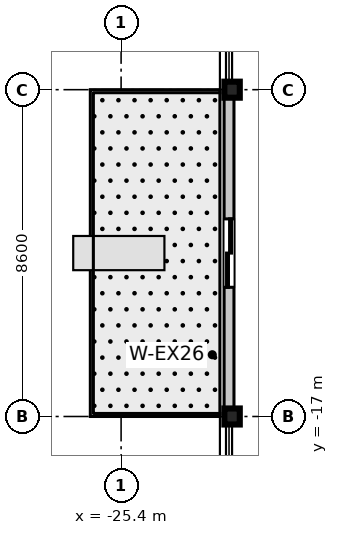
"""IFC4 building model, lengths in metres.
Left out: names, types, materials, properties, quantities, classifications, styles, units other than length and angle.
Written with IfcOpenShell. Run it as: python <this file> out.ifc"""

import sys

from ifc_helpers import new_model, si_unit, direction, frame, frame_2d, origin, origin_2d, place, context, subcontext, project, spatial, rectangle, i_section, extrude, source, transform, mapped, element, fill, save


model = new_model("IFC4")
c1 = context("Model", 3, precision=1e-05, world=origin(), true_north=direction((0.0, 1.0)))
c2 = subcontext(c1, "Body", "Model", "MODEL_VIEW")
j1 = project(units=[si_unit("LENGTHUNIT", "METRE"), si_unit("PLANEANGLEUNIT", "RADIAN")], contexts=[c1])
p1 = place(None, origin())
s1 = spatial("IfcSite", under=j1, at=p1, CompositionType="ELEMENT")
p2 = place(p1, origin())
s2 = spatial("IfcBuilding", under=s1, at=p2, CompositionType="ELEMENT")
p3 = place(p2, frame((0.0, 0.0, 185.5)))
s3 = spatial("IfcBuildingStorey", under=s2, at=p3, CompositionType="ELEMENT", Elevation=185.5)
m1 = source(origin(), c2, "Body", "SweptSolid", [
    extrude(i_section(OverallWidth=0.406, OverallDepth=0.422, WebThickness=0.019, FlangeThickness=0.03, at=origin_2d()), origin(), (0.0, 0.0, 1.0), 3.605),
])
for number, where, z_axis, x_axis in (
    (1, (-22.48, -17.0, 0.0), (0.0, 0.0, 1.0), (1.0, 0.0, 0.0)),
    (2, (-22.48, -8.4, 0.0), (0.0, 0.0, 1.0), (1.0, 0.0, 0.0)),
):
    element("IfcColumn", number, at=place(p3, frame(where, z_axis=z_axis, x_axis=x_axis)), inside=s3, PredefinedType="COLUMN", context=c2, shape_type="MappedRepresentation", body=[
        mapped(m1, transform((0.0, 0.0, 0.0), scale=1.0)),
    ])
m2 = source(origin(), c2, "Body", "SweptSolid", [
    extrude(rectangle(XDim=8.6, YDim=0.26, at=frame_2d((4.3, 0.0))), origin(), (0.0, 0.0, 1.0), 2.87),
])
p4 = place(p3, frame((-22.56, -17.0, 0.0), z_axis=(0.0, 0.0, 1.0), x_axis=(0.0, 1.0, 0.0)))
e3 = element("IfcWall", 3, at=p4, inside=s3, PredefinedType="STANDARD", context=c2, shape_type="MappedRepresentation", body=[
    mapped(m2, transform((0.0, 0.0, 0.0), scale=1.0)),
])
p5 = place(p4, frame((3.4, 0.0, 0.0)))
e4 = element("IfcOpeningElement", 4, at=p5, cuts=e3, PredefinedType="OPENING", context=c2, shape_type="SweptSolid", body=[
    extrude(rectangle(XDim=1.8, YDim=2.25, at=frame_2d((0.9, 1.125))), frame((0.0, 0.14, 0.0), z_axis=(0.0, -1.0, 0.0), x_axis=(1.0, 0.0, 0.0)), (0.0, 0.0, 1.0), 0.28),
])
m3 = source(origin(), c2, "Body", "SweptSolid", [
    extrude(rectangle(XDim=1.8, YDim=2.25, at=frame_2d((0.9, 1.125))), frame((0.0, 0.025, 0.0), z_axis=(0.0, -1.0, 0.0), x_axis=(1.0, 0.0, 0.0)), (0.0, 0.0, 1.0), 0.05),
])
p6 = place(p5, origin())
e5 = element("IfcDoor", 5, at=p6, inside=s3, OperationType="DOUBLE_DOOR_SLIDING", PredefinedType="DOOR", context=c2, shape_type="MappedRepresentation", body=[
    mapped(m3, transform((0.0, 0.0, 0.0), scale=1.0)),
])
fill(e4, e5)
save(model, sys.argv[1])
